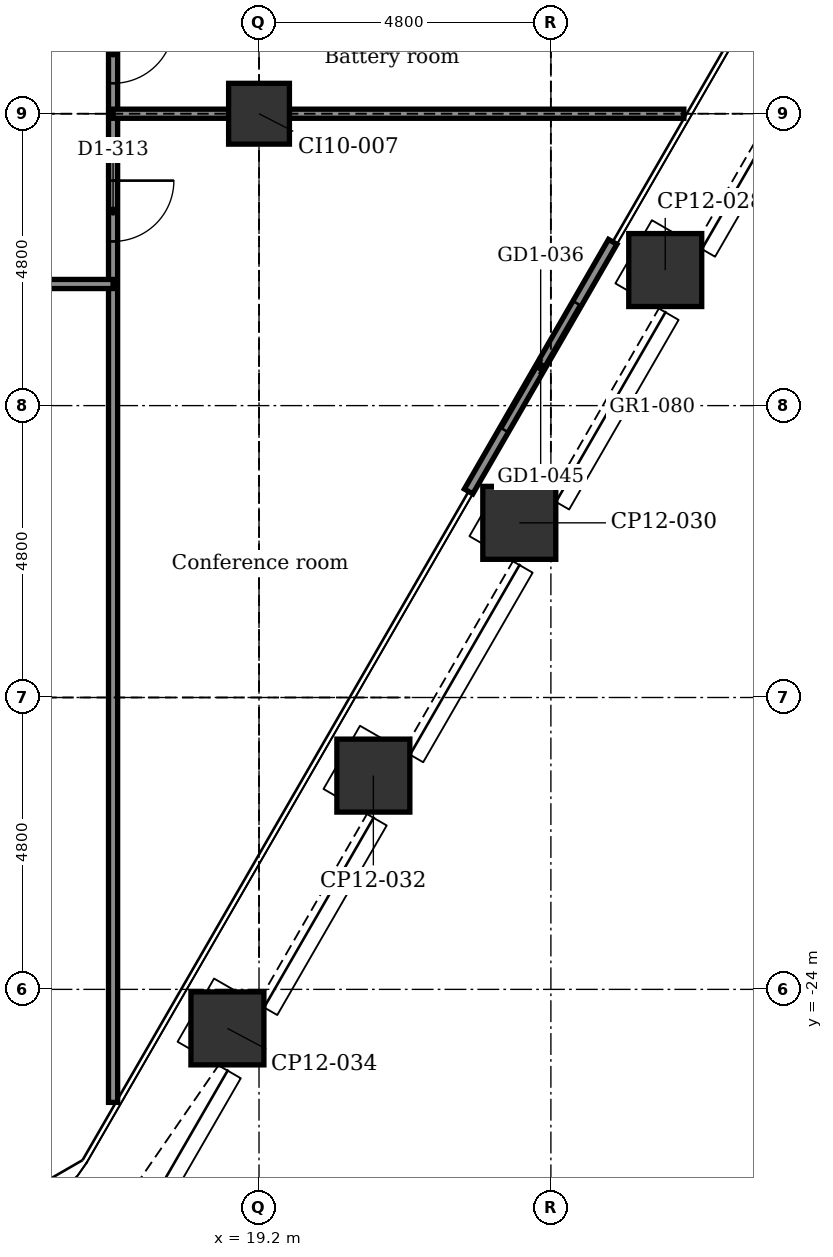
"""IFC4 building model, lengths in metres.
Left out: names, types, materials, properties, quantities, classifications, styles, units other than length and angle.
Written with IfcOpenShell. Run it as: python <this file> out.ifc"""

import sys

from ifc_helpers import new_model, si_unit, direction, frame, frame_2d, origin, origin_2d, place, context, subcontext, project, spatial, rectangle, extrude, element, fill, save


model = new_model("IFC4")
c1 = context("Model", 3, precision=1e-05, world=origin(), true_north=direction((0.0, 1.0)))
c2 = subcontext(c1, "Body", "Model", "MODEL_VIEW")
j1 = project(units=[si_unit("LENGTHUNIT", "METRE"), si_unit("PLANEANGLEUNIT", "RADIAN")], contexts=[c1])
p1 = place(None, origin())
s1 = spatial("IfcSite", under=j1, at=p1, CompositionType="ELEMENT")
p2 = place(p1, origin())
s2 = spatial("IfcBuilding", under=s1, at=p2, CompositionType="ELEMENT")
p3 = place(p2, frame((0.0, 0.0, 113.9)))
s3 = spatial("IfcBuildingStorey", under=s2, at=p3, CompositionType="ELEMENT", Elevation=113.9)
for number, where, z_axis, x_axis in (
    (1, (25.88, -12.171, -0.2), (0.0, 0.0, 1.0), (0.5, 0.866, 0.0)),
    (2, (23.48, -16.328, -0.2), (0.0, 0.0, 1.0), (0.5, 0.866, 0.0)),
    (3, (21.08, -20.485, -0.2), (0.0, 0.0, 1.0), (0.5, 0.866, 0.0)),
    (4, (18.68, -24.642, -0.2), (0.0, 0.0, 1.0), (0.5, 0.866, 0.0)),
):
    element("IfcColumn", number, at=place(p3, frame(where, z_axis=z_axis, x_axis=x_axis)), inside=s3, PredefinedType="COLUMN", context=c2, shape_type="SweptSolid", body=[
        extrude(rectangle(XDim=1.2, YDim=1.2, at=origin_2d()), origin(), (0.0, 0.0, 1.0), 4.5),
    ])
p4 = place(p3, frame((19.2, -9.6, -0.2), z_axis=(0.0, 0.0, 1.0), x_axis=(1.0, 0.0, 0.0)))
e5 = element("IfcColumn", 5, at=p4, inside=s3, PredefinedType="COLUMN", context=c2, shape_type="SweptSolid", body=[
    extrude(rectangle(XDim=1.0, YDim=1.0, at=origin_2d()), origin(), (0.0, 0.0, 1.0), 4.5),
])
p5 = place(p3, frame((25.017, -11.707, 0.0), z_axis=(0.0, 0.0, 1.0), x_axis=(-0.499978080042, -0.866038058908, 0.0)))
e6 = element("IfcWall", 6, at=p5, inside=s3, PredefinedType="PARTITIONING", context=c2, shape_type="SweptSolid", body=[
    extrude(rectangle(XDim=4.74, YDim=0.16, at=frame_2d((2.37, 0.0))), origin(), (0.0, 0.0, 1.0), 4.3),
])
p6 = place(p5, frame((1.17, 0.0, 0.0)))
e7 = element("IfcOpeningElement", 7, at=p6, cuts=e6, PredefinedType="OPENING", context=c2, shape_type="SweptSolid", body=[
    extrude(rectangle(XDim=2.4, YDim=2.4, at=frame_2d((1.2, 1.2))), frame((0.0, 0.09, 0.0), z_axis=(0.0, -1.0, 0.0), x_axis=(1.0, 0.0, 0.0)), (0.0, 0.0, 1.0), 0.18),
])
p7 = place(p3, frame((16.8, -25.858, 0.0), z_axis=(0.0, 0.0, 1.0), x_axis=(0.0, 1.0, 0.0)))
e8 = element("IfcWall", 8, at=p7, inside=s3, PredefinedType="PARTITIONING", context=c2, shape_type="SweptSolid", body=[
    extrude(rectangle(XDim=21.908, YDim=0.15, at=frame_2d((10.954, 0.0))), origin(), (0.0, 0.0, 1.0), 4.3),
])
p8 = place(p7, frame((14.158, 0.0, 0.0)))
e9 = element("IfcOpeningElement", 9, at=p8, cuts=e8, PredefinedType="OPENING", context=c2, shape_type="SweptSolid", body=[
    extrude(rectangle(XDim=1.0, YDim=2.1, at=frame_2d((0.5, 1.05))), frame((0.0, 0.085, 0.0), z_axis=(0.0, -1.0, 0.0), x_axis=(1.0, 0.0, 0.0)), (0.0, 0.0, 1.0), 0.17),
])
p9 = place(p7, frame((16.759, 0.0, 0.0)))
e10 = element("IfcOpeningElement", 10, at=p9, cuts=e8, PredefinedType="OPENING", context=c2, shape_type="SweptSolid", body=[
    extrude(rectangle(XDim=1.0, YDim=2.1, at=frame_2d((0.5, 1.05))), frame((0.0, 0.085, 0.0), z_axis=(0.0, -1.0, 0.0), x_axis=(1.0, 0.0, 0.0)), (0.0, 0.0, 1.0), 0.17),
])
p10 = place(p7, frame((19.658, 0.0, 0.0)))
e11 = element("IfcOpeningElement", 11, at=p10, cuts=e8, PredefinedType="OPENING", context=c2, shape_type="SweptSolid", body=[
    extrude(rectangle(XDim=1.0, YDim=2.1, at=frame_2d((0.5, 1.05))), frame((0.0, 0.085, 0.0), z_axis=(0.0, -1.0, 0.0), x_axis=(1.0, 0.0, 0.0)), (0.0, 0.0, 1.0), 0.17),
])
p11 = place(p3, frame((-16.8, -12.4, 0.0), z_axis=(0.0, 0.0, 1.0), x_axis=(1.0, 0.0, 0.0)))
e12 = element("IfcWall", 12, at=p11, inside=s3, PredefinedType="PARTITIONING", context=c2, shape_type="SweptSolid", body=[
    extrude(rectangle(XDim=33.6, YDim=0.15, at=frame_2d((16.8, 0.0))), origin(), (0.0, 0.0, 1.0), 4.3),
])
p12 = place(p11, frame((9.1, 0.0, 0.0)))
e13 = element("IfcOpeningElement", 13, at=p12, cuts=e12, PredefinedType="OPENING", context=c2, shape_type="SweptSolid", body=[
    extrude(rectangle(XDim=1.0, YDim=2.1, at=frame_2d((0.5, 1.05))), frame((0.0, 0.085, 0.0), z_axis=(0.0, -1.0, 0.0), x_axis=(1.0, 0.0, 0.0)), (0.0, 0.0, 1.0), 0.17),
])
p13 = place(p11, frame((14.915, 0.0, 0.0)))
e14 = element("IfcOpeningElement", 14, at=p13, cuts=e12, PredefinedType="OPENING", context=c2, shape_type="SweptSolid", body=[
    extrude(rectangle(XDim=1.0, YDim=2.1, at=frame_2d((0.5, 1.05))), frame((0.0, 0.085, 0.0), z_axis=(0.0, -1.0, 0.0), x_axis=(1.0, 0.0, 0.0)), (0.0, 0.0, 1.0), 0.17),
])
p14 = place(p11, frame((17.685, 0.0, 0.0)))
e15 = element("IfcOpeningElement", 15, at=p14, cuts=e12, PredefinedType="OPENING", context=c2, shape_type="SweptSolid", body=[
    extrude(rectangle(XDim=1.0, YDim=2.1, at=frame_2d((0.5, 1.05))), frame((0.0, 0.085, 0.0), z_axis=(0.0, -1.0, 0.0), x_axis=(1.0, 0.0, 0.0)), (0.0, 0.0, 1.0), 0.17),
])
p15 = place(p11, frame((24.225, 0.0, 0.0)))
e16 = element("IfcOpeningElement", 16, at=p15, cuts=e12, PredefinedType="OPENING", context=c2, shape_type="SweptSolid", body=[
    extrude(rectangle(XDim=1.0, YDim=2.1, at=frame_2d((0.5, 1.05))), frame((0.0, 0.085, 0.0), z_axis=(0.0, -1.0, 0.0), x_axis=(1.0, 0.0, 0.0)), (0.0, 0.0, 1.0), 0.17),
])
p16 = place(p11, frame((29.5, 0.0, 0.0)))
e17 = element("IfcOpeningElement", 17, at=p16, cuts=e12, PredefinedType="OPENING", context=c2, shape_type="SweptSolid", body=[
    extrude(rectangle(XDim=1.0, YDim=2.1, at=frame_2d((0.5, 1.05))), frame((0.0, 0.085, 0.0), z_axis=(0.0, -1.0, 0.0), x_axis=(1.0, 0.0, 0.0)), (0.0, 0.0, 1.0), 0.17),
])
p17 = place(p11, frame((1.95, 0.0, 0.0)))
e18 = element("IfcOpeningElement", 18, at=p17, cuts=e12, PredefinedType="OPENING", context=c2, shape_type="SweptSolid", body=[
    extrude(rectangle(XDim=0.9, YDim=2.1, at=frame_2d((0.45, 1.05))), frame((0.0, 0.085, 0.0), z_axis=(0.0, -1.0, 0.0), x_axis=(1.0, 0.0, 0.0)), (0.0, 0.0, 1.0), 0.17),
])
p18 = place(p11, frame((4.95, 0.0, 0.0)))
e19 = element("IfcOpeningElement", 19, at=p18, cuts=e12, PredefinedType="OPENING", context=c2, shape_type="SweptSolid", body=[
    extrude(rectangle(XDim=0.9, YDim=2.1, at=frame_2d((0.45, 1.05))), frame((0.0, 0.085, 0.0), z_axis=(0.0, -1.0, 0.0), x_axis=(1.0, 0.0, 0.0)), (0.0, 0.0, 1.0), 0.17),
])
p19 = place(p3, frame((16.8, -9.6, 0.0), z_axis=(0.0, 0.0, 1.0), x_axis=(1.0, 0.0, 0.0)))
e20 = element("IfcWall", 20, at=p19, inside=s3, PredefinedType="PARTITIONING", context=c2, shape_type="SweptSolid", body=[
    extrude(rectangle(XDim=1.9, YDim=0.15, at=frame_2d((0.95, 0.0))), origin(), (0.0, 0.0, 1.0), 3.692),
])
p20 = place(p3, frame((19.7, -9.6, 0.0), z_axis=(0.0, 0.0, 1.0), x_axis=(1.0, 0.0, 0.0)))
e21 = element("IfcWall", 21, at=p20, inside=s3, PredefinedType="PARTITIONING", context=c2, shape_type="SweptSolid", body=[
    extrude(rectangle(XDim=6.487, YDim=0.15, at=frame_2d((3.243, 0.0))), origin(), (0.0, 0.0, 1.0), 3.692),
])
p21 = place(p6, origin())
e22 = element("IfcDoor", 22, at=p21, inside=s3, OperationType="DOUBLE_DOOR_SLIDING", PredefinedType="DOOR", context=c2, shape_type="SweptSolid", body=[
    extrude(rectangle(XDim=2.4, YDim=2.4, at=frame_2d((1.2, 1.2))), frame((0.0, 0.025, 0.0), z_axis=(0.0, -1.0, 0.0), x_axis=(1.0, 0.0, 0.0)), (0.0, 0.0, 1.0), 0.05),
])
fill(e7, e22)
p22 = place(p8, frame((1.0, 0.0, 0.0), z_axis=(0.0, 0.0, 1.0), x_axis=(-1.0, 0.0, 0.0)))
e23 = element("IfcDoor", 23, at=p22, inside=s3, OperationType="SINGLE_SWING_RIGHT", PredefinedType="DOOR", context=c2, shape_type="SweptSolid", body=[
    extrude(rectangle(XDim=1.0, YDim=2.1, at=frame_2d((0.5, 1.05))), frame((0.0, 0.025, 0.0), z_axis=(0.0, -1.0, 0.0), x_axis=(1.0, 0.0, 0.0)), (0.0, 0.0, 1.0), 0.05),
])
fill(e9, e23)
p23 = place(p9, frame((1.0, 0.0, 0.0), z_axis=(0.0, 0.0, 1.0), x_axis=(-1.0, 0.0, 0.0)))
e24 = element("IfcDoor", 24, at=p23, inside=s3, OperationType="SINGLE_SWING_RIGHT", PredefinedType="DOOR", context=c2, shape_type="SweptSolid", body=[
    extrude(rectangle(XDim=1.0, YDim=2.1, at=frame_2d((0.5, 1.05))), frame((0.0, 0.025, 0.0), z_axis=(0.0, -1.0, 0.0), x_axis=(1.0, 0.0, 0.0)), (0.0, 0.0, 1.0), 0.05),
])
fill(e10, e24)
save(model, sys.argv[1])
